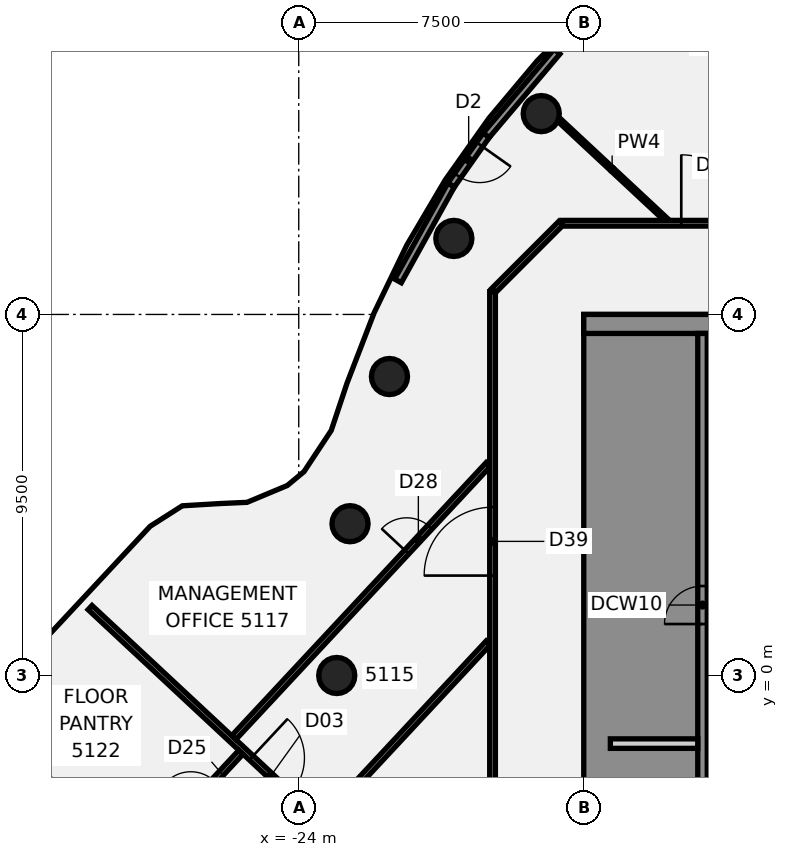
"""IFC4 building model, lengths in metres.
Left out: names, types, materials, properties, quantities, classifications, styles, units other than length and angle.
Written with IfcOpenShell. Run it as: python <this file> out.ifc"""

import sys

from ifc_helpers import new_model, si_unit, direction, frame, frame_2d, origin, origin_2d, place, context, subcontext, project, spatial, polyline, rectangle, circle, outline, extrude, element, fill, save


model = new_model("IFC4")
c1 = context("Model", 3, precision=1e-05, world=origin(), true_north=direction((0.0, 1.0)))
c2 = subcontext(c1, "Body", "Model", "MODEL_VIEW")
j1 = project(units=[si_unit("LENGTHUNIT", "METRE"), si_unit("PLANEANGLEUNIT", "RADIAN")], contexts=[c1])
p1 = place(None, origin())
s1 = spatial("IfcSite", under=j1, at=p1, CompositionType="ELEMENT")
p2 = place(p1, origin())
s2 = spatial("IfcBuilding", under=s1, at=p2, CompositionType="ELEMENT")
p3 = place(p2, frame((0.0, 0.0, 204.1)))
s3 = spatial("IfcBuildingStorey", under=s2, at=p3, CompositionType="ELEMENT", Elevation=204.1)
for number, where, z_axis, x_axis in (
    (1, (-17.619, 14.784, -0.14), (0.0, 0.0, 1.0), (1.0, 0.0, 0.0)),
    (2, (-19.919, 11.5, -0.14), (0.0, 0.0, 1.0), (1.0, 0.0, 0.0)),
    (3, (-21.613, 7.866, -0.14), (0.0, 0.0, 1.0), (1.0, 0.0, 0.0)),
    (4, (-22.651, 3.994, -0.14), (0.0, 0.0, 1.0), (1.0, 0.0, 0.0)),
    (5, (-23.0, 0.0, -0.14), (0.0, 0.0, 1.0), (1.0, 0.0, 0.0)),
):
    element("IfcColumn", number, at=place(p3, frame(where, z_axis=z_axis, x_axis=x_axis)), inside=s3, PredefinedType="COLUMN", context=c2, shape_type="SweptSolid", body=[
        extrude(circle(Radius=0.475, at=origin_2d()), origin(), (0.0, 0.0, 1.0), 3.6),
    ])
p4 = place(p3, frame((-29.491, 1.788, 0.0), z_axis=(0.0, 0.0, 1.0), x_axis=(0.731478721907, -0.681864267576, 0.0)))
e6 = element("IfcWall", 6, at=p4, inside=s3, PredefinedType="PARTITIONING", context=c2, shape_type="SweptSolid", body=[
    extrude(rectangle(XDim=8.759, YDim=0.15, at=frame_2d((4.379, 0.0))), origin(), (0.0, 0.0, 1.0), 2.864),
])
p5 = place(p4, frame((5.799, 0.0, 0.0)))
e7 = element("IfcOpeningElement", 7, at=p5, cuts=e6, PredefinedType="OPENING", context=c2, shape_type="SweptSolid", body=[
    extrude(rectangle(XDim=1.4, YDim=2.1, at=frame_2d((0.7, 1.05))), frame((0.0, 0.085, 0.0), z_axis=(0.0, -1.0, 0.0), x_axis=(1.0, 0.0, 0.0)), (0.0, 0.0, 1.0), 0.17),
])
p6 = place(p3, frame((-17.173, 14.639, 0.0), z_axis=(0.0, 0.0, 1.0), x_axis=(0.731508874243, -0.681831919833, 0.0)))
e8 = element("IfcWall", 8, at=p6, inside=s3, PredefinedType="PARTITIONING", context=c2, shape_type="SweptSolid", body=[
    extrude(rectangle(XDim=3.883, YDim=0.1, at=frame_2d((1.941, 0.0))), origin(), (0.0, 0.0, 1.0), 2.864),
])
p7 = place(p3, frame((-17.065, 11.9, 0.0), z_axis=(0.0, 0.0, 1.0), x_axis=(1.0, 0.0, 0.0)))
e9 = element("IfcWall", 9, at=p7, inside=s3, PredefinedType="PARTITIONING", context=c2, shape_type="SweptSolid", body=[
    extrude(rectangle(XDim=34.165, YDim=0.15, at=frame_2d((17.083, 0.0))), origin(), (0.0, 0.0, 1.0), 2.864),
])
p8 = place(p7, frame((24.539, 0.0, 0.0)))
e10 = element("IfcOpeningElement", 10, at=p8, cuts=e9, PredefinedType="OPENING", context=c2, shape_type="SweptSolid", body=[
    extrude(rectangle(XDim=1.8, YDim=2.1, at=frame_2d((0.9, 1.05))), frame((0.0, 0.085, 0.0), z_axis=(0.0, -1.0, 0.0), x_axis=(1.0, 0.0, 0.0)), (0.0, 0.0, 1.0), 0.17),
])
p9 = place(p7, frame((8.831, 0.0, 0.0)))
e11 = element("IfcOpeningElement", 11, at=p9, cuts=e9, PredefinedType="OPENING", context=c2, shape_type="SweptSolid", body=[
    extrude(rectangle(XDim=1.8, YDim=2.1, at=frame_2d((0.9, 1.05))), frame((0.0, 0.085, 0.0), z_axis=(0.0, -1.0, 0.0), x_axis=(1.0, 0.0, 0.0)), (0.0, 0.0, 1.0), 0.17),
])
p10 = place(p7, frame((3.131, 0.0, 0.0)))
e12 = element("IfcOpeningElement", 12, at=p10, cuts=e9, PredefinedType="OPENING", context=c2, shape_type="SweptSolid", body=[
    extrude(rectangle(XDim=1.8, YDim=2.1, at=frame_2d((0.9, 1.05))), frame((0.0, 0.085, 0.0), z_axis=(0.0, -1.0, 0.0), x_axis=(1.0, 0.0, 0.0)), (0.0, 0.0, 1.0), 0.17),
])
p11 = place(p3, frame((-18.872, 10.128, 0.0), z_axis=(0.0, 0.0, 1.0), x_axis=(0.707106781187, 0.707106781187, 0.0)))
e13 = element("IfcWall", 13, at=p11, inside=s3, PredefinedType="PARTITIONING", context=c2, shape_type="SweptSolid", body=[
    extrude(rectangle(XDim=2.505, YDim=0.15, at=frame_2d((1.253, 0.0))), origin(), (0.0, 0.0, 1.0), 2.864),
])
p12 = place(p3, frame((-28.169, -4.859, 0.0), z_axis=(0.0, 0.0, 1.0), x_axis=(0.681784531985, 0.731553041103, 0.0)))
e14 = element("IfcWall", 14, at=p12, inside=s3, PredefinedType="PARTITIONING", context=c2, shape_type="SweptSolid", body=[
    extrude(rectangle(XDim=3.88, YDim=0.15, at=frame_2d((1.94, 0.0))), origin(), (0.0, 0.0, 1.0), 2.864),
])
p13 = place(p12, frame((1.95, 0.0, 0.0)))
e15 = element("IfcOpeningElement", 15, at=p13, cuts=e14, PredefinedType="OPENING", context=c2, shape_type="SweptSolid", body=[
    extrude(rectangle(XDim=0.9, YDim=2.1, at=frame_2d((0.45, 1.05))), frame((0.0, 0.085, 0.0), z_axis=(0.0, -1.0, 0.0), x_axis=(1.0, 0.0, 0.0)), (0.0, 0.0, 1.0), 0.17),
])
p14 = place(p3, frame((-25.707, -1.631, 0.0), z_axis=(0.0, 0.0, 1.0), x_axis=(0.68177853135, 0.73155863346, 0.0)))
e16 = element("IfcWall", 16, at=p14, inside=s3, PredefinedType="PARTITIONING", context=c2, shape_type="SweptSolid", body=[
    extrude(rectangle(XDim=9.819, YDim=0.15, at=frame_2d((4.909, 0.0))), origin(), (0.0, 0.0, 1.0), 2.864),
])
p15 = place(p14, frame((6.67, 0.0, 0.0)))
e17 = element("IfcOpeningElement", 17, at=p15, cuts=e16, PredefinedType="OPENING", context=c2, shape_type="SweptSolid", body=[
    extrude(rectangle(XDim=0.9, YDim=2.1, at=frame_2d((0.45, 1.05))), frame((0.0, 0.085, 0.0), z_axis=(0.0, -1.0, 0.0), x_axis=(1.0, 0.0, 0.0)), (0.0, 0.0, 1.0), 0.17),
])
p16 = place(p3, frame((-23.365, -3.812, 0.0), z_axis=(0.0, 0.0, 1.0), x_axis=(0.681775833985, 0.731561147269, 0.0)))
e18 = element("IfcWall", 18, at=p16, inside=s3, PredefinedType="PARTITIONING", context=c2, shape_type="SweptSolid", body=[
    extrude(rectangle(XDim=6.385, YDim=0.15, at=frame_2d((3.192, 0.0))), origin(), (0.0, 0.0, 1.0), 2.864),
])
p17 = place(p3, frame((-18.9, -10.1, 0.0), z_axis=(0.0, 0.0, 1.0), x_axis=(0.0, 1.0, 0.0)))
e19 = element("IfcWall", 19, at=p17, inside=s3, PredefinedType="PARTITIONING", context=c2, shape_type="SweptSolid", body=[
    extrude(rectangle(XDim=20.2, YDim=0.15, at=frame_2d((10.1, 0.0))), origin(), (0.0, 0.0, 1.0), 2.864),
])
p18 = place(p17, frame((12.729, 0.0, 0.0)))
e20 = element("IfcOpeningElement", 20, at=p18, cuts=e19, PredefinedType="OPENING", context=c2, shape_type="SweptSolid", body=[
    extrude(rectangle(XDim=1.8, YDim=2.1, at=frame_2d((0.9, 1.05))), frame((0.0, 0.085, 0.0), z_axis=(0.0, -1.0, 0.0), x_axis=(1.0, 0.0, 0.0)), (0.0, 0.0, 1.0), 0.17),
])
p19 = place(p17, frame((4.979, 0.0, 0.0)))
e21 = element("IfcOpeningElement", 21, at=p19, cuts=e19, PredefinedType="OPENING", context=c2, shape_type="SweptSolid", body=[
    extrude(rectangle(XDim=0.9, YDim=2.1, at=frame_2d((0.45, 1.05))), frame((0.0, 0.085, 0.0), z_axis=(0.0, -1.0, 0.0), x_axis=(1.0, 0.0, 0.0)), (0.0, 0.0, 1.0), 0.17),
])
p20 = place(p3, frame((-17.204, 16.417, 0.0), z_axis=(0.0, 0.0, 1.0), x_axis=(-0.645983966585, -0.763350977543, 0.0)))
e22 = element("IfcWall", 22, at=p20, inside=s3, PredefinedType="SOLIDWALL", context=c2, shape_type="SweptSolid", body=[
    extrude(rectangle(XDim=2.885, YDim=0.2, at=frame_2d((1.443, 0.0))), origin(), (0.0, 0.0, 1.0), 3.46),
])
p21 = place(p3, frame((-19.99, 12.907, 0.0), z_axis=(0.0, 0.0, 1.0), x_axis=(-0.484673094774, -0.874695370516, 0.0)))
e23 = element("IfcWall", 23, at=p21, inside=s3, PredefinedType="SOLIDWALL", context=c2, shape_type="SweptSolid", body=[
    extrude(rectangle(XDim=2.886, YDim=0.2, at=frame_2d((1.443, 0.0))), origin(), (0.0, 0.0, 1.0), 3.46),
])
p22 = place(p3, frame((-19.067, 14.215, 0.0), z_axis=(0.0, 0.0, 1.0), x_axis=(-0.57647949336, -0.817111616449, 0.0)))
e24 = element("IfcWall", 24, at=p22, inside=s3, PredefinedType="SOLIDWALL", context=c2, shape_type="SweptSolid", body=[
    extrude(rectangle(XDim=1.6, YDim=0.2, at=frame_2d((0.8, 0.0))), origin(), (0.0, 0.0, 1.0), 3.46),
])
p23 = place(p22, frame((0.3, 0.0, 0.0)))
e25 = element("IfcOpeningElement", 25, at=p23, cuts=e24, PredefinedType="OPENING", context=c2, shape_type="SweptSolid", body=[
    extrude(rectangle(XDim=1.0, YDim=2.4, at=frame_2d((0.5, 1.2))), frame((0.0, 0.11, 0.0), z_axis=(0.0, -1.0, 0.0), x_axis=(1.0, 0.0, 0.0)), (0.0, 0.0, 1.0), 0.22),
])
p24 = place(p3, origin())
e26 = element("IfcWall", 26, at=p24, inside=s3, PredefinedType="SHEAR", context=c2, shape_type="SweptSolid", body=[
    extrude(outline(polyline([(-13.5, -8.125), (-16.0, -8.125), (-16.0, -5.625), (-13.5, -5.625), (-13.5, -5.375), (-16.0, -5.375), (-16.0, 5.375), (-13.5, 5.375), (-13.5, 5.625), (-16.0, 5.625), (-16.0, 8.125), (-13.5, 8.125), (-13.5, 9.0), (-16.0, 9.0), (-16.5, 9.0), (-16.5, -9.0), (-16.0, -9.0), (-13.5, -9.0), (-13.5, -8.125)])), origin(), (0.0, 0.0, 1.0), 3.46),
])
p25 = place(p3, frame((-16.5, 9.25, 0.0), z_axis=(0.0, 0.0, 1.0), x_axis=(1.0, 0.0, 0.0)))
e27 = element("IfcWall", 27, at=p25, inside=s3, PredefinedType="SHEAR", context=c2, shape_type="SweptSolid", body=[
    extrude(rectangle(XDim=13.0, YDim=0.5, at=frame_2d((6.5, 0.0))), origin(), (0.0, 0.0, 1.0), 3.46),
])
p26 = place(p3, frame((-13.375, -9.0, 0.0), z_axis=(0.0, 0.0, 1.0), x_axis=(0.0, 1.0, 0.0)))
e28 = element("IfcWall", 28, at=p26, inside=s3, PredefinedType="SHEAR", context=c2, shape_type="SweptSolid", body=[
    extrude(rectangle(XDim=18.0, YDim=0.25, at=frame_2d((9.0, 0.0))), origin(), (0.0, 0.0, 1.0), 3.46),
])
p27 = place(p26, frame((1.425, 0.0, 0.0)))
e29 = element("IfcOpeningElement", 29, at=p27, cuts=e28, PredefinedType="OPENING", context=c2, shape_type="SweptSolid", body=[
    extrude(rectangle(XDim=1.4, YDim=2.1, at=frame_2d((0.7, 1.05))), frame((0.0, 0.135, 0.0), z_axis=(0.0, -1.0, 0.0), x_axis=(1.0, 0.0, 0.0)), (0.0, 0.0, 1.0), 0.27),
])
p28 = place(p26, frame((4.854, 0.0, 0.0)))
e30 = element("IfcOpeningElement", 30, at=p28, cuts=e28, PredefinedType="OPENING", context=c2, shape_type="SweptSolid", body=[
    extrude(rectangle(XDim=1.0, YDim=2.1, at=frame_2d((0.5, 1.05))), frame((0.0, 0.135, 0.0), z_axis=(0.0, -1.0, 0.0), x_axis=(1.0, 0.0, 0.0)), (0.0, 0.0, 1.0), 0.27),
])
p29 = place(p26, frame((10.354, 0.0, 0.0)))
e31 = element("IfcOpeningElement", 31, at=p29, cuts=e28, PredefinedType="OPENING", context=c2, shape_type="SweptSolid", body=[
    extrude(rectangle(XDim=1.0, YDim=2.1, at=frame_2d((0.5, 1.05))), frame((0.0, 0.135, 0.0), z_axis=(0.0, -1.0, 0.0), x_axis=(1.0, 0.0, 0.0)), (0.0, 0.0, 1.0), 0.27),
])
p30 = place(p3, frame((-15.8, -1.792, 0.0), z_axis=(0.0, 0.0, 1.0), x_axis=(1.0, 0.0, 0.0)))
e32 = element("IfcWall", 32, at=p30, inside=s3, PredefinedType="PARTITIONING", context=c2, shape_type="SweptSolid", body=[
    extrude(rectangle(XDim=2.3, YDim=0.25, at=frame_2d((1.15, 0.0))), origin(), (0.0, 0.0, 1.0), 3.46),
])
p31 = place(p3, frame((-30.751, -2.643, -0.14), z_axis=(0.0, 0.0, 1.0), x_axis=(0.731504173653, -0.681836962864, 0.0)))
e33 = element("IfcWall", 33, at=p31, inside=s3, PredefinedType="SHEAR", context=c2, shape_type="SweptSolid", body=[
    extrude(rectangle(XDim=3.2, YDim=0.2, at=frame_2d((1.6, 0.0))), origin(), (0.0, 0.0, 1.0), 3.004),
])
p32 = place(p5, origin())
e34 = element("IfcDoor", 34, at=p32, inside=s3, OperationType="DOUBLE_DOOR_SINGLE_SWING", PredefinedType="DOOR", context=c2, shape_type="SweptSolid", body=[
    extrude(rectangle(XDim=1.4, YDim=2.1, at=frame_2d((0.7, 1.05))), frame((0.0, 0.025, 0.0), z_axis=(0.0, -1.0, 0.0), x_axis=(1.0, 0.0, 0.0)), (0.0, 0.0, 1.0), 0.05),
])
fill(e7, e34)
p33 = place(p10, origin())
e35 = element("IfcDoor", 35, at=p33, inside=s3, OperationType="DOUBLE_DOOR_SINGLE_SWING", PredefinedType="DOOR", context=c2, shape_type="SweptSolid", body=[
    extrude(rectangle(XDim=1.8, YDim=2.1, at=frame_2d((0.9, 1.05))), frame((0.0, 0.025, 0.0), z_axis=(0.0, -1.0, 0.0), x_axis=(1.0, 0.0, 0.0)), (0.0, 0.0, 1.0), 0.05),
])
fill(e12, e35)
p34 = place(p15, origin())
e36 = element("IfcDoor", 36, at=p34, inside=s3, OperationType="SINGLE_SWING_LEFT", PredefinedType="DOOR", context=c2, shape_type="SweptSolid", body=[
    extrude(rectangle(XDim=0.9, YDim=2.1, at=frame_2d((0.45, 1.05))), frame((0.0, 0.025, 0.0), z_axis=(0.0, -1.0, 0.0), x_axis=(1.0, 0.0, 0.0)), (0.0, 0.0, 1.0), 0.05),
])
fill(e17, e36)
p35 = place(p18, frame((1.8, 0.0, 0.0), z_axis=(0.0, 0.0, 1.0), x_axis=(-1.0, 0.0, 0.0)))
e37 = element("IfcDoor", 37, at=p35, inside=s3, OperationType="DOUBLE_DOOR_SINGLE_SWING", PredefinedType="DOOR", context=c2, shape_type="SweptSolid", body=[
    extrude(rectangle(XDim=1.8, YDim=2.1, at=frame_2d((0.9, 1.05))), frame((0.0, 0.025, 0.0), z_axis=(0.0, -1.0, 0.0), x_axis=(1.0, 0.0, 0.0)), (0.0, 0.0, 1.0), 0.05),
])
fill(e20, e37)
p36 = place(p23, origin())
e38 = element("IfcDoor", 38, at=p36, inside=s3, OperationType="SINGLE_SWING_LEFT", PredefinedType="DOOR", context=c2, shape_type="SweptSolid", body=[
    extrude(rectangle(XDim=1.0, YDim=2.4, at=frame_2d((0.5, 1.2))), frame((0.0, 0.025, 0.0), z_axis=(0.0, -1.0, 0.0), x_axis=(1.0, 0.0, 0.0)), (0.0, 0.0, 1.0), 0.05),
])
fill(e25, e38)
p37 = place(p29, origin())
e39 = element("IfcDoor", 39, at=p37, inside=s3, OperationType="SINGLE_SWING_LEFT", PredefinedType="DOOR", context=c2, shape_type="SweptSolid", body=[
    extrude(rectangle(XDim=1.0, YDim=2.1, at=frame_2d((0.5, 1.05))), frame((0.0, 0.025, 0.0), z_axis=(0.0, -1.0, 0.0), x_axis=(1.0, 0.0, 0.0)), (0.0, 0.0, 1.0), 0.05),
])
fill(e31, e39)
save(model, sys.argv[1])
